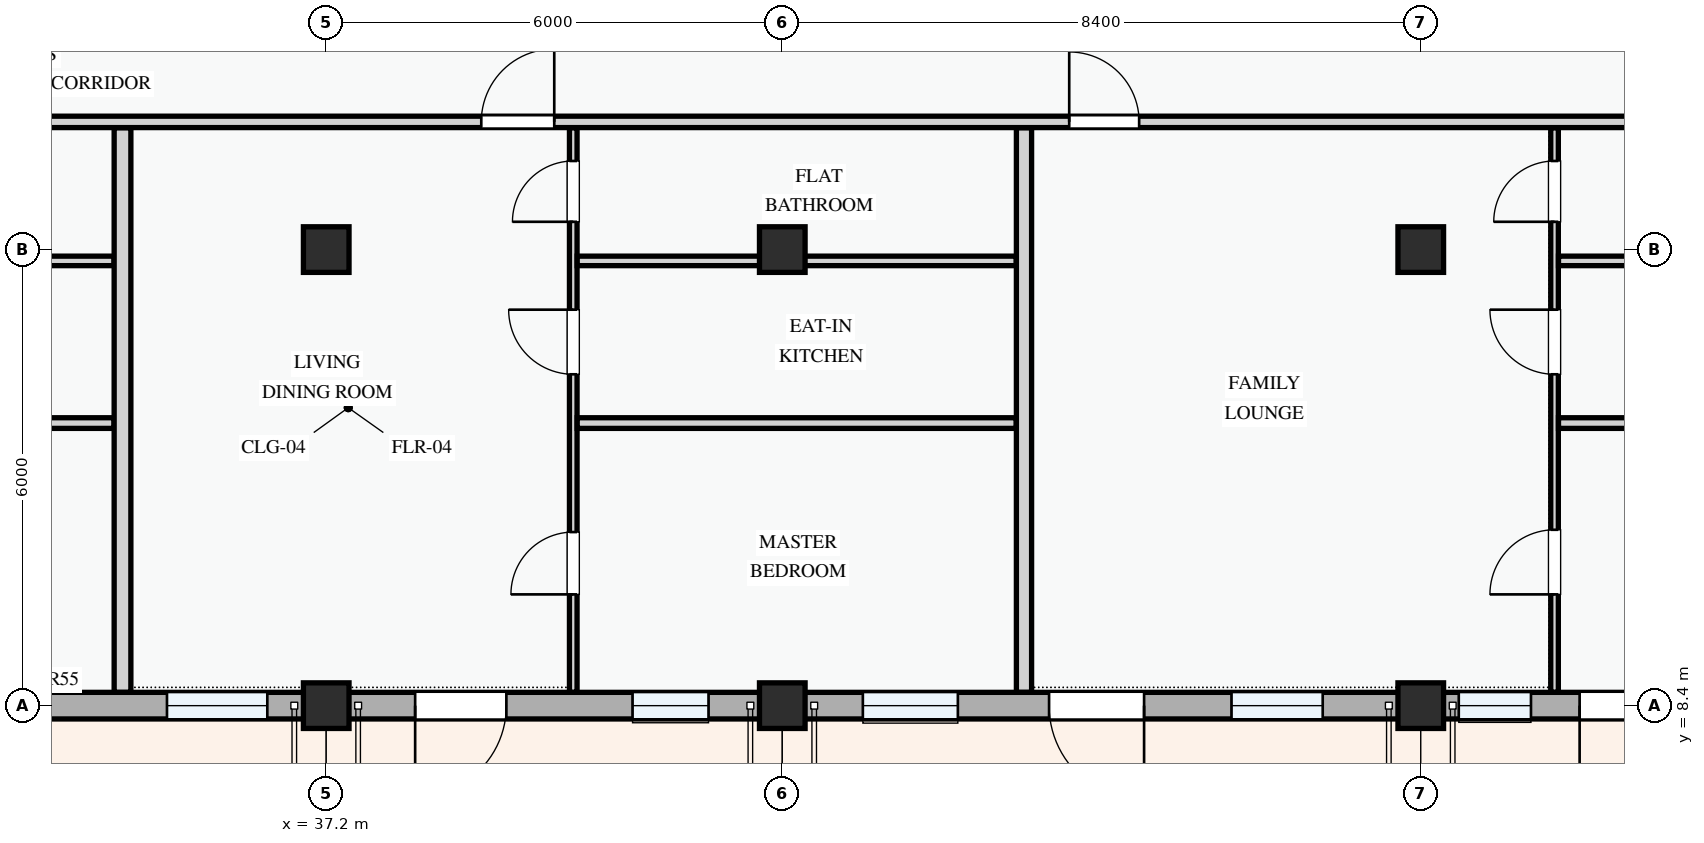
"""IFC4 building model, lengths in metres.
Left out: names, types, materials, properties, quantities, classifications, styles, units other than length and angle.
Written with IfcOpenShell. Run it as: python <this file> out.ifc"""

import sys

from ifc_helpers import new_model, si_unit, direction, frame, frame_2d, origin, origin_2d, place, context, subcontext, project, spatial, rectangle, extrude, element, fill, save


model = new_model("IFC4")
c1 = context("Model", 3, precision=1e-05, world=origin(), true_north=direction((0.0, 1.0)))
c2 = subcontext(c1, "Body", "Model", "MODEL_VIEW")
j1 = project(units=[si_unit("LENGTHUNIT", "METRE"), si_unit("PLANEANGLEUNIT", "RADIAN")], contexts=[c1])
p1 = place(None, origin())
s1 = spatial("IfcSite", under=j1, at=p1, CompositionType="ELEMENT")
p2 = place(p1, origin())
s2 = spatial("IfcBuilding", under=s1, at=p2, CompositionType="ELEMENT")
p3 = place(p2, frame((0.0, 0.0, 8.1)))
s3 = spatial("IfcBuildingStorey", under=s2, at=p3, CompositionType="ELEMENT", Elevation=8.1)
for number, where, z_axis, x_axis in (
    (1, (37.2, 8.4, 0.0), (0.0, 0.0, 1.0), (1.0, 0.0, 0.0)),
    (2, (37.2, 14.4, 0.0), (0.0, 0.0, 1.0), (1.0, 0.0, 0.0)),
    (3, (43.2, 8.4, 0.0), (0.0, 0.0, 1.0), (1.0, 0.0, 0.0)),
    (4, (43.2, 14.4, 0.0), (0.0, 0.0, 1.0), (1.0, 0.0, 0.0)),
    (5, (51.6, 8.4, 0.0), (0.0, 0.0, 1.0), (1.0, 0.0, 0.0)),
    (6, (51.6, 14.4, 0.0), (0.0, 0.0, 1.0), (1.0, 0.0, 0.0)),
):
    element("IfcColumn", number, at=place(p3, frame(where, z_axis=z_axis, x_axis=x_axis)), inside=s3, PredefinedType="COLUMN", context=c2, shape_type="SweptSolid", body=[
        extrude(rectangle(XDim=0.6, YDim=0.6, at=origin_2d()), origin(), (0.0, 0.0, 1.0), 3.3),
    ])
p4 = place(p3, frame((28.8, 8.4, 0.0), z_axis=(0.0, 0.0, 1.0), x_axis=(1.0, 0.0, 0.0)))
e7 = element("IfcWall", 7, at=p4, inside=s3, PredefinedType="STANDARD", context=c2, shape_type="SweptSolid", body=[
    extrude(rectangle(XDim=8.4, YDim=0.35, at=frame_2d((4.2, 0.0))), origin(), (0.0, 0.0, 1.0), 2.375),
])
p5 = place(p4, frame((0.62, 0.0, 0.0)))
e8 = element("IfcOpeningElement", 8, at=p5, cuts=e7, PredefinedType="OPENING", context=c2, shape_type="SweptSolid", body=[
    extrude(rectangle(XDim=1.1, YDim=2.15, at=frame_2d((0.55, 1.075))), frame((0.0, 0.185, 0.0), z_axis=(0.0, -1.0, 0.0), x_axis=(1.0, 0.0, 0.0)), (0.0, 0.0, 1.0), 0.37),
])
p6 = place(p4, frame((3.245, 0.0, 0.78)))
e9 = element("IfcOpeningElement", 9, at=p6, cuts=e7, PredefinedType="OPENING", context=c2, shape_type="SweptSolid", body=[
    extrude(rectangle(XDim=1.0, YDim=1.25, at=frame_2d((0.5, 0.625))), frame((0.0, 0.185, 0.0), z_axis=(0.0, -1.0, 0.0), x_axis=(1.0, 0.0, 0.0)), (0.0, 0.0, 1.0), 0.37),
])
p7 = place(p4, frame((6.305, 0.0, 0.78)))
e10 = element("IfcOpeningElement", 10, at=p7, cuts=e7, PredefinedType="OPENING", context=c2, shape_type="SweptSolid", body=[
    extrude(rectangle(XDim=1.32, YDim=1.35, at=frame_2d((0.66, 0.675))), frame((0.0, 0.185, 0.0), z_axis=(0.0, -1.0, 0.0), x_axis=(1.0, 0.0, 0.0)), (0.0, 0.0, 1.0), 0.37),
])
p8 = place(p3, frame((37.2, 8.4, 0.0), z_axis=(0.0, 0.0, 1.0), x_axis=(1.0, 0.0, 0.0)))
e11 = element("IfcWall", 11, at=p8, inside=s3, PredefinedType="STANDARD", context=c2, shape_type="SweptSolid", body=[
    extrude(rectangle(XDim=6.0, YDim=0.35, at=frame_2d((3.0, 0.0))), origin(), (0.0, 0.0, 1.0), 2.475),
])
p9 = place(p8, frame((1.17, 0.0, 0.0)))
e12 = element("IfcOpeningElement", 12, at=p9, cuts=e11, PredefinedType="OPENING", context=c2, shape_type="SweptSolid", body=[
    extrude(rectangle(XDim=1.2, YDim=2.15, at=frame_2d((0.6, 1.075))), frame((0.0, 0.185, 0.0), z_axis=(0.0, -1.0, 0.0), x_axis=(1.0, 0.0, 0.0)), (0.0, 0.0, 1.0), 0.37),
])
p10 = place(p8, frame((4.03, 0.0, 0.78)))
e13 = element("IfcOpeningElement", 13, at=p10, cuts=e11, PredefinedType="OPENING", context=c2, shape_type="SweptSolid", body=[
    extrude(rectangle(XDim=1.0, YDim=1.25, at=frame_2d((0.5, 0.625))), frame((0.0, 0.185, 0.0), z_axis=(0.0, -1.0, 0.0), x_axis=(1.0, 0.0, 0.0)), (0.0, 0.0, 1.0), 0.37),
])
p11 = place(p3, frame((43.2, 8.4, 0.0), z_axis=(0.0, 0.0, 1.0), x_axis=(1.0, 0.0, 0.0)))
e14 = element("IfcWall", 14, at=p11, inside=s3, PredefinedType="STANDARD", context=c2, shape_type="SweptSolid", body=[
    extrude(rectangle(XDim=8.4, YDim=0.35, at=frame_2d((4.2, 0.0))), origin(), (0.0, 0.0, 1.0), 2.375),
])
p12 = place(p11, frame((3.51, 0.0, 0.0)))
e15 = element("IfcOpeningElement", 15, at=p12, cuts=e14, PredefinedType="OPENING", context=c2, shape_type="SweptSolid", body=[
    extrude(rectangle(XDim=1.25, YDim=2.2, at=frame_2d((0.625, 1.1))), frame((0.0, 0.185, 0.0), z_axis=(0.0, -1.0, 0.0), x_axis=(1.0, 0.0, 0.0)), (0.0, 0.0, 1.0), 0.37),
])
p13 = place(p11, frame((1.06, 0.0, 0.78)))
e16 = element("IfcOpeningElement", 16, at=p13, cuts=e14, PredefinedType="OPENING", context=c2, shape_type="SweptSolid", body=[
    extrude(rectangle(XDim=1.25, YDim=1.3, at=frame_2d((0.625, 0.65))), frame((0.0, 0.185, 0.0), z_axis=(0.0, -1.0, 0.0), x_axis=(1.0, 0.0, 0.0)), (0.0, 0.0, 1.0), 0.37),
])
p14 = place(p11, frame((5.91, 0.0, 0.78)))
e17 = element("IfcOpeningElement", 17, at=p14, cuts=e14, PredefinedType="OPENING", context=c2, shape_type="SweptSolid", body=[
    extrude(rectangle(XDim=1.2, YDim=1.35, at=frame_2d((0.6, 0.675))), frame((0.0, 0.185, 0.0), z_axis=(0.0, -1.0, 0.0), x_axis=(1.0, 0.0, 0.0)), (0.0, 0.0, 1.0), 0.37),
])
p15 = place(p3, frame((51.6, 8.4, 0.0), z_axis=(0.0, 0.0, 1.0), x_axis=(1.0, 0.0, 0.0)))
e18 = element("IfcWall", 18, at=p15, inside=s3, PredefinedType="STANDARD", context=c2, shape_type="SweptSolid", body=[
    extrude(rectangle(XDim=6.0, YDim=0.35, at=frame_2d((3.0, 0.0))), origin(), (0.0, 0.0, 1.0), 2.475),
])
p16 = place(p15, frame((2.09, 0.0, 0.0)))
e19 = element("IfcOpeningElement", 19, at=p16, cuts=e18, PredefinedType="OPENING", context=c2, shape_type="SweptSolid", body=[
    extrude(rectangle(XDim=1.3, YDim=2.15, at=frame_2d((0.65, 1.075))), frame((0.0, 0.185, 0.0), z_axis=(0.0, -1.0, 0.0), x_axis=(1.0, 0.0, 0.0)), (0.0, 0.0, 1.0), 0.37),
])
p17 = place(p15, frame((0.5, 0.0, 0.78)))
e20 = element("IfcOpeningElement", 20, at=p17, cuts=e18, PredefinedType="OPENING", context=c2, shape_type="SweptSolid", body=[
    extrude(rectangle(XDim=0.95, YDim=1.15, at=frame_2d((0.475, 0.575))), frame((0.0, 0.185, 0.0), z_axis=(0.0, -1.0, 0.0), x_axis=(1.0, 0.0, 0.0)), (0.0, 0.0, 1.0), 0.37),
])
p18 = place(p15, frame((3.975, 0.0, 0.78)))
e21 = element("IfcOpeningElement", 21, at=p18, cuts=e18, PredefinedType="OPENING", context=c2, shape_type="SweptSolid", body=[
    extrude(rectangle(XDim=1.3, YDim=1.4, at=frame_2d((0.65, 0.7))), frame((0.0, 0.185, 0.0), z_axis=(0.0, -1.0, 0.0), x_axis=(1.0, 0.0, 0.0)), (0.0, 0.0, 1.0), 0.37),
])
p19 = place(p3, frame((27.042, 12.118, 0.0), z_axis=(0.0, 0.0, 1.0), x_axis=(1.0, 0.0, 0.0)))
e22 = element("IfcWall", 22, at=p19, inside=s3, PredefinedType="PARTITIONING", context=c2, shape_type="SweptSolid", body=[
    extrude(rectangle(XDim=7.366, YDim=0.14, at=frame_2d((3.683, 0.0))), origin(), (0.0, 0.0, 1.0), 3.0),
])
p20 = place(p3, frame((27.042, 14.251, 0.0), z_axis=(0.0, 0.0, 1.0), x_axis=(1.0, 0.0, 0.0)))
e23 = element("IfcWall", 23, at=p20, inside=s3, PredefinedType="PARTITIONING", context=c2, shape_type="SweptSolid", body=[
    extrude(rectangle(XDim=7.366, YDim=0.125, at=frame_2d((3.683, 0.0))), origin(), (0.0, 0.0, 1.0), 2.375),
])
p21 = place(p3, frame((40.45, 8.577, 0.0), z_axis=(0.0, 0.0, 1.0), x_axis=(0.0, 1.0, 0.0)))
e24 = element("IfcWall", 24, at=p21, inside=s3, PredefinedType="PARTITIONING", context=c2, shape_type="SweptSolid", body=[
    extrude(rectangle(XDim=7.426, YDim=0.1, at=frame_2d((3.713, 0.0))), origin(), (0.0, 0.0, 1.0), 3.0),
])
p22 = place(p21, frame((1.287, 0.0, 0.0)))
e25 = element("IfcOpeningElement", 25, at=p22, cuts=e24, PredefinedType="OPENING", context=c2, shape_type="SweptSolid", body=[
    extrude(rectangle(XDim=0.82, YDim=2.08, at=frame_2d((0.41, 1.04))), frame((0.0, 0.06, 0.0), z_axis=(0.0, -1.0, 0.0), x_axis=(1.0, 0.0, 0.0)), (0.0, 0.0, 1.0), 0.12),
])
p23 = place(p21, frame((4.182, 0.0, 0.0)))
e26 = element("IfcOpeningElement", 26, at=p23, cuts=e24, PredefinedType="OPENING", context=c2, shape_type="SweptSolid", body=[
    extrude(rectangle(XDim=0.85, YDim=2.1, at=frame_2d((0.425, 1.05))), frame((0.0, 0.06, 0.0), z_axis=(0.0, -1.0, 0.0), x_axis=(1.0, 0.0, 0.0)), (0.0, 0.0, 1.0), 0.12),
])
p24 = place(p21, frame((6.189, 0.0, 0.0)))
e27 = element("IfcOpeningElement", 27, at=p24, cuts=e24, PredefinedType="OPENING", context=c2, shape_type="SweptSolid", body=[
    extrude(rectangle(XDim=0.8, YDim=2.1, at=frame_2d((0.4, 1.05))), frame((0.0, 0.06, 0.0), z_axis=(0.0, -1.0, 0.0), x_axis=(1.0, 0.0, 0.0)), (0.0, 0.0, 1.0), 0.12),
])
p25 = place(p3, frame((40.502, 12.118, 0.0), z_axis=(0.0, 0.0, 1.0), x_axis=(1.0, 0.0, 0.0)))
e28 = element("IfcWall", 28, at=p25, inside=s3, PredefinedType="PARTITIONING", context=c2, shape_type="SweptSolid", body=[
    extrude(rectangle(XDim=5.776, YDim=0.14, at=frame_2d((2.888, 0.0))), origin(), (0.0, 0.0, 1.0), 3.0),
])
p26 = place(p3, frame((40.502, 14.251, 0.0), z_axis=(0.0, 0.0, 1.0), x_axis=(1.0, 0.0, 0.0)))
e29 = element("IfcWall", 29, at=p26, inside=s3, PredefinedType="PARTITIONING", context=c2, shape_type="SweptSolid", body=[
    extrude(rectangle(XDim=5.776, YDim=0.125, at=frame_2d((2.888, 0.0))), origin(), (0.0, 0.0, 1.0), 2.375),
])
p27 = place(p3, frame((34.52, 8.577, 0.0), z_axis=(0.0, 0.0, 1.0), x_axis=(0.0, 1.0, 0.0)))
e30 = element("IfcWall", 30, at=p27, inside=s3, PredefinedType="PARTITIONING", context=c2, shape_type="SweptSolid", body=[
    extrude(rectangle(XDim=7.426, YDim=0.22, at=frame_2d((3.713, 0.0))), origin(), (0.0, 0.0, 1.0), 3.0),
])
p28 = place(p3, frame((53.36, 8.577, 0.0), z_axis=(0.0, 0.0, 1.0), x_axis=(0.0, 1.0, 0.0)))
e31 = element("IfcWall", 31, at=p28, inside=s3, PredefinedType="PARTITIONING", context=c2, shape_type="SweptSolid", body=[
    extrude(rectangle(XDim=7.426, YDim=0.1, at=frame_2d((3.713, 0.0))), origin(), (0.0, 0.0, 1.0), 3.0),
])
p29 = place(p28, frame((1.287, 0.0, 0.0)))
e32 = element("IfcOpeningElement", 32, at=p29, cuts=e31, PredefinedType="OPENING", context=c2, shape_type="SweptSolid", body=[
    extrude(rectangle(XDim=0.85, YDim=2.1, at=frame_2d((0.425, 1.05))), frame((0.0, 0.06, 0.0), z_axis=(0.0, -1.0, 0.0), x_axis=(1.0, 0.0, 0.0)), (0.0, 0.0, 1.0), 0.12),
])
p30 = place(p28, frame((4.182, 0.0, 0.0)))
e33 = element("IfcOpeningElement", 33, at=p30, cuts=e31, PredefinedType="OPENING", context=c2, shape_type="SweptSolid", body=[
    extrude(rectangle(XDim=0.85, YDim=2.1, at=frame_2d((0.425, 1.05))), frame((0.0, 0.06, 0.0), z_axis=(0.0, -1.0, 0.0), x_axis=(1.0, 0.0, 0.0)), (0.0, 0.0, 1.0), 0.12),
])
p31 = place(p28, frame((6.189, 0.0, 0.0)))
e34 = element("IfcOpeningElement", 34, at=p31, cuts=e31, PredefinedType="OPENING", context=c2, shape_type="SweptSolid", body=[
    extrude(rectangle(XDim=0.8, YDim=2.1, at=frame_2d((0.4, 1.05))), frame((0.0, 0.06, 0.0), z_axis=(0.0, -1.0, 0.0), x_axis=(1.0, 0.0, 0.0)), (0.0, 0.0, 1.0), 0.12),
])
p32 = place(p3, frame((53.412, 12.118, 0.0), z_axis=(0.0, 0.0, 1.0), x_axis=(1.0, 0.0, 0.0)))
e35 = element("IfcWall", 35, at=p32, inside=s3, PredefinedType="PARTITIONING", context=c2, shape_type="SweptSolid", body=[
    extrude(rectangle(XDim=4.011, YDim=0.14, at=frame_2d((2.005, 0.0))), origin(), (0.0, 0.0, 1.0), 3.0),
])
p33 = place(p3, frame((53.412, 14.251, 0.0), z_axis=(0.0, 0.0, 1.0), x_axis=(1.0, 0.0, 0.0)))
e36 = element("IfcWall", 36, at=p33, inside=s3, PredefinedType="PARTITIONING", context=c2, shape_type="SweptSolid", body=[
    extrude(rectangle(XDim=4.011, YDim=0.125, at=frame_2d((2.005, 0.0))), origin(), (0.0, 0.0, 1.0), 2.475),
])
p34 = place(p3, frame((46.38, 8.577, 0.0), z_axis=(0.0, 0.0, 1.0), x_axis=(0.0, 1.0, 0.0)))
e37 = element("IfcWall", 37, at=p34, inside=s3, PredefinedType="PARTITIONING", context=c2, shape_type="SweptSolid", body=[
    extrude(rectangle(XDim=7.426, YDim=0.2, at=frame_2d((3.713, 0.0))), origin(), (0.0, 0.0, 1.0), 3.0),
])
p35 = place(p3, frame((22.66, 16.08, 0.0), z_axis=(0.0, 0.0, 1.0), x_axis=(1.0, 0.0, 0.0)))
e38 = element("IfcWall", 38, at=p35, inside=s3, PredefinedType="PARTITIONING", context=c2, shape_type="SweptSolid", body=[
    extrude(rectangle(XDim=34.763, YDim=0.15, at=frame_2d((17.382, 0.0))), origin(), (0.0, 0.0, 1.0), 3.0),
])
p36 = place(p35, frame((2.672, 0.0, 0.0)))
e39 = element("IfcOpeningElement", 39, at=p36, cuts=e38, PredefinedType="OPENING", context=c2, shape_type="SweptSolid", body=[
    extrude(rectangle(XDim=0.92, YDim=2.1, at=frame_2d((0.46, 1.05))), frame((0.0, 0.085, 0.0), z_axis=(0.0, -1.0, 0.0), x_axis=(1.0, 0.0, 0.0)), (0.0, 0.0, 1.0), 0.17),
])
p37 = place(p35, frame((16.58, 0.0, 0.0)))
e40 = element("IfcOpeningElement", 40, at=p37, cuts=e38, PredefinedType="OPENING", context=c2, shape_type="SweptSolid", body=[
    extrude(rectangle(XDim=0.96, YDim=2.12, at=frame_2d((0.48, 1.06))), frame((0.0, 0.085, 0.0), z_axis=(0.0, -1.0, 0.0), x_axis=(1.0, 0.0, 0.0)), (0.0, 0.0, 1.0), 0.17),
])
p38 = place(p35, frame((24.315, 0.0, 0.0)))
e41 = element("IfcOpeningElement", 41, at=p38, cuts=e38, PredefinedType="OPENING", context=c2, shape_type="SweptSolid", body=[
    extrude(rectangle(XDim=0.92, YDim=2.1, at=frame_2d((0.46, 1.05))), frame((0.0, 0.085, 0.0), z_axis=(0.0, -1.0, 0.0), x_axis=(1.0, 0.0, 0.0)), (0.0, 0.0, 1.0), 0.17),
])
p39 = place(p7, origin())
e42 = element("IfcWindow", 42, at=p39, inside=s3, PartitioningType="SINGLE_PANEL", PredefinedType="WINDOW", context=c2, shape_type="SweptSolid", body=[
    extrude(rectangle(XDim=1.32, YDim=1.35, at=frame_2d((0.66, 0.675))), frame((0.0, 0.03, 0.0), z_axis=(0.0, -1.0, 0.0), x_axis=(1.0, 0.0, 0.0)), (0.0, 0.0, 1.0), 0.06),
])
fill(e10, e42)
p40 = place(p9, frame((1.2, 0.0, 0.0), z_axis=(0.0, 0.0, 1.0), x_axis=(-1.0, 0.0, 0.0)))
e43 = element("IfcDoor", 43, at=p40, inside=s3, OperationType="SINGLE_SWING_RIGHT", PredefinedType="DOOR", context=c2, shape_type="SweptSolid", body=[
    extrude(rectangle(XDim=1.2, YDim=2.15, at=frame_2d((0.6, 1.075))), frame((0.0, 0.025, 0.0), z_axis=(0.0, -1.0, 0.0), x_axis=(1.0, 0.0, 0.0)), (0.0, 0.0, 1.0), 0.05),
])
fill(e12, e43)
p41 = place(p10, origin())
e44 = element("IfcWindow", 44, at=p41, inside=s3, PartitioningType="SINGLE_PANEL", PredefinedType="WINDOW", context=c2, shape_type="SweptSolid", body=[
    extrude(rectangle(XDim=1.0, YDim=1.25, at=frame_2d((0.5, 0.625))), frame((0.0, 0.03, 0.0), z_axis=(0.0, -1.0, 0.0), x_axis=(1.0, 0.0, 0.0)), (0.0, 0.0, 1.0), 0.06),
])
fill(e13, e44)
p42 = place(p12, frame((1.25, 0.0, 0.0), z_axis=(0.0, 0.0, 1.0), x_axis=(-1.0, 0.0, 0.0)))
e45 = element("IfcDoor", 45, at=p42, inside=s3, OperationType="SINGLE_SWING_LEFT", PredefinedType="DOOR", context=c2, shape_type="SweptSolid", body=[
    extrude(rectangle(XDim=1.25, YDim=2.2, at=frame_2d((0.625, 1.1))), frame((0.0, 0.025, 0.0), z_axis=(0.0, -1.0, 0.0), x_axis=(1.0, 0.0, 0.0)), (0.0, 0.0, 1.0), 0.05),
])
fill(e15, e45)
p43 = place(p13, origin())
e46 = element("IfcWindow", 46, at=p43, inside=s3, PartitioningType="SINGLE_PANEL", PredefinedType="WINDOW", context=c2, shape_type="SweptSolid", body=[
    extrude(rectangle(XDim=1.25, YDim=1.3, at=frame_2d((0.625, 0.65))), frame((0.0, 0.03, 0.0), z_axis=(0.0, -1.0, 0.0), x_axis=(1.0, 0.0, 0.0)), (0.0, 0.0, 1.0), 0.06),
])
fill(e16, e46)
p44 = place(p14, origin())
e47 = element("IfcWindow", 47, at=p44, inside=s3, PartitioningType="SINGLE_PANEL", PredefinedType="WINDOW", context=c2, shape_type="SweptSolid", body=[
    extrude(rectangle(XDim=1.2, YDim=1.35, at=frame_2d((0.6, 0.675))), frame((0.0, 0.03, 0.0), z_axis=(0.0, -1.0, 0.0), x_axis=(1.0, 0.0, 0.0)), (0.0, 0.0, 1.0), 0.06),
])
fill(e17, e47)
p45 = place(p16, frame((1.3, 0.0, 0.0), z_axis=(0.0, 0.0, 1.0), x_axis=(-1.0, 0.0, 0.0)))
e48 = element("IfcDoor", 48, at=p45, inside=s3, OperationType="SINGLE_SWING_RIGHT", PredefinedType="DOOR", context=c2, shape_type="SweptSolid", body=[
    extrude(rectangle(XDim=1.3, YDim=2.15, at=frame_2d((0.65, 1.075))), frame((0.0, 0.025, 0.0), z_axis=(0.0, -1.0, 0.0), x_axis=(1.0, 0.0, 0.0)), (0.0, 0.0, 1.0), 0.05),
])
fill(e19, e48)
p46 = place(p17, origin())
e49 = element("IfcWindow", 49, at=p46, inside=s3, PartitioningType="SINGLE_PANEL", PredefinedType="WINDOW", context=c2, shape_type="SweptSolid", body=[
    extrude(rectangle(XDim=0.95, YDim=1.15, at=frame_2d((0.475, 0.575))), frame((0.0, 0.03, 0.0), z_axis=(0.0, -1.0, 0.0), x_axis=(1.0, 0.0, 0.0)), (0.0, 0.0, 1.0), 0.06),
])
fill(e20, e49)
p47 = place(p22, origin())
e50 = element("IfcDoor", 50, at=p47, inside=s3, OperationType="SINGLE_SWING_LEFT", PredefinedType="DOOR", context=c2, shape_type="SweptSolid", body=[
    extrude(rectangle(XDim=0.82, YDim=2.08, at=frame_2d((0.41, 1.04))), frame((0.0, 0.025, 0.0), z_axis=(0.0, -1.0, 0.0), x_axis=(1.0, 0.0, 0.0)), (0.0, 0.0, 1.0), 0.05),
])
fill(e25, e50)
p48 = place(p23, origin())
e51 = element("IfcDoor", 51, at=p48, inside=s3, OperationType="SINGLE_SWING_RIGHT", PredefinedType="DOOR", context=c2, shape_type="SweptSolid", body=[
    extrude(rectangle(XDim=0.85, YDim=2.1, at=frame_2d((0.425, 1.05))), frame((0.0, 0.025, 0.0), z_axis=(0.0, -1.0, 0.0), x_axis=(1.0, 0.0, 0.0)), (0.0, 0.0, 1.0), 0.05),
])
fill(e26, e51)
p49 = place(p24, origin())
e52 = element("IfcDoor", 52, at=p49, inside=s3, OperationType="SINGLE_SWING_LEFT", PredefinedType="DOOR", context=c2, shape_type="SweptSolid", body=[
    extrude(rectangle(XDim=0.8, YDim=2.1, at=frame_2d((0.4, 1.05))), frame((0.0, 0.025, 0.0), z_axis=(0.0, -1.0, 0.0), x_axis=(1.0, 0.0, 0.0)), (0.0, 0.0, 1.0), 0.05),
])
fill(e27, e52)
p50 = place(p29, origin())
e53 = element("IfcDoor", 53, at=p50, inside=s3, OperationType="SINGLE_SWING_LEFT", PredefinedType="DOOR", context=c2, shape_type="SweptSolid", body=[
    extrude(rectangle(XDim=0.85, YDim=2.1, at=frame_2d((0.425, 1.05))), frame((0.0, 0.025, 0.0), z_axis=(0.0, -1.0, 0.0), x_axis=(1.0, 0.0, 0.0)), (0.0, 0.0, 1.0), 0.05),
])
fill(e32, e53)
p51 = place(p30, origin())
e54 = element("IfcDoor", 54, at=p51, inside=s3, OperationType="SINGLE_SWING_RIGHT", PredefinedType="DOOR", context=c2, shape_type="SweptSolid", body=[
    extrude(rectangle(XDim=0.85, YDim=2.1, at=frame_2d((0.425, 1.05))), frame((0.0, 0.025, 0.0), z_axis=(0.0, -1.0, 0.0), x_axis=(1.0, 0.0, 0.0)), (0.0, 0.0, 1.0), 0.05),
])
fill(e33, e54)
p52 = place(p31, origin())
e55 = element("IfcDoor", 55, at=p52, inside=s3, OperationType="SINGLE_SWING_LEFT", PredefinedType="DOOR", context=c2, shape_type="SweptSolid", body=[
    extrude(rectangle(XDim=0.8, YDim=2.1, at=frame_2d((0.4, 1.05))), frame((0.0, 0.025, 0.0), z_axis=(0.0, -1.0, 0.0), x_axis=(1.0, 0.0, 0.0)), (0.0, 0.0, 1.0), 0.05),
])
fill(e34, e55)
p53 = place(p37, origin())
e56 = element("IfcDoor", 56, at=p53, inside=s3, OperationType="SINGLE_SWING_RIGHT", PredefinedType="DOOR", context=c2, shape_type="SweptSolid", body=[
    extrude(rectangle(XDim=0.96, YDim=2.12, at=frame_2d((0.48, 1.06))), frame((0.0, 0.025, 0.0), z_axis=(0.0, -1.0, 0.0), x_axis=(1.0, 0.0, 0.0)), (0.0, 0.0, 1.0), 0.05),
])
fill(e40, e56)
p54 = place(p38, origin())
e57 = element("IfcDoor", 57, at=p54, inside=s3, OperationType="SINGLE_SWING_LEFT", PredefinedType="DOOR", context=c2, shape_type="SweptSolid", body=[
    extrude(rectangle(XDim=0.92, YDim=2.1, at=frame_2d((0.46, 1.05))), frame((0.0, 0.025, 0.0), z_axis=(0.0, -1.0, 0.0), x_axis=(1.0, 0.0, 0.0)), (0.0, 0.0, 1.0), 0.05),
])
fill(e41, e57)
save(model, sys.argv[1])
